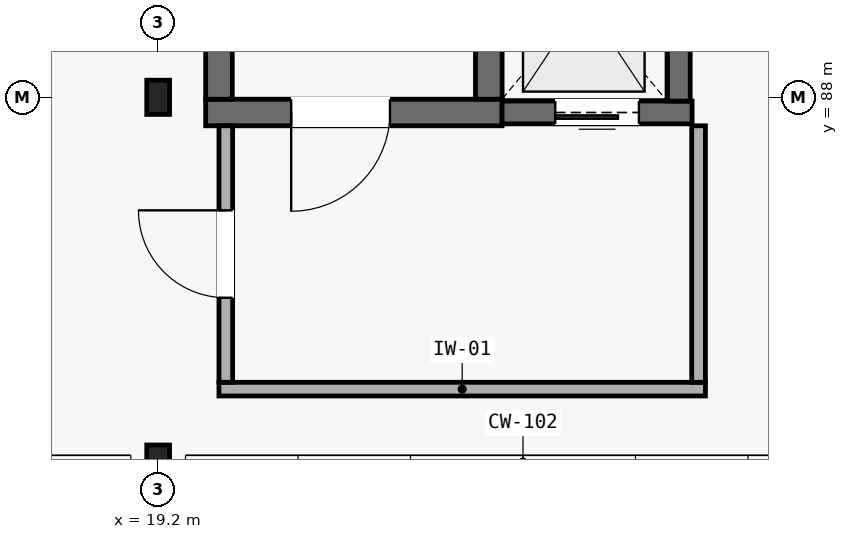
"""IFC4 building model, lengths in metres.
Left out: names, types, materials, properties, quantities, classifications, styles, units other than length and angle.
Written with IfcOpenShell. Run it as: python <this file> out.ifc"""

import sys

from ifc_helpers import new_model, si_unit, direction, frame, frame_2d, origin, origin_2d, place, context, subcontext, project, spatial, rectangle, i_section, extrude, element, fill, save


model = new_model("IFC4")
c1 = context("Model", 3, precision=1e-05, world=origin(), true_north=direction((0.0, 1.0)))
c2 = subcontext(c1, "Body", "Model", "MODEL_VIEW")
j1 = project(units=[si_unit("LENGTHUNIT", "METRE"), si_unit("PLANEANGLEUNIT", "RADIAN")], contexts=[c1])
p1 = place(None, origin())
s1 = spatial("IfcSite", under=j1, at=p1, CompositionType="ELEMENT")
p2 = place(p1, origin())
s2 = spatial("IfcBuilding", under=s1, at=p2, CompositionType="ELEMENT")
p3 = place(p2, frame((0.0, 0.0, 31.15)))
s3 = spatial("IfcBuildingStorey", under=s2, at=p3, CompositionType="ELEMENT", Elevation=31.15)
for number, where, z_axis, x_axis in (
    (1, (19.2, 83.2, 0.0), (0.0, 0.0, 1.0), (1.0, 0.0, 0.0)),
    (2, (19.2, 88.0, 0.0), (0.0, 0.0, 1.0), (1.0, 0.0, 0.0)),
):
    element("IfcColumn", number, at=place(p3, frame(where, z_axis=z_axis, x_axis=x_axis)), inside=s3, PredefinedType="COLUMN", context=c2, shape_type="SweptSolid", body=[
        extrude(i_section(OverallWidth=0.3, OverallDepth=0.45, WebThickness=0.014, FlangeThickness=0.026, FilletRadius=0.027, at=origin_2d()), origin(), (0.0, 0.0, 1.0), 4.9),
    ])
p4 = place(p3, frame((19.825, 87.8, 0.0), z_axis=(0.0, 0.0, 1.0), x_axis=(1.0, 0.0, 0.0)))
e3 = element("IfcWall", 3, at=p4, inside=s3, PredefinedType="SHEAR", context=c2, shape_type="SweptSolid", body=[
    extrude(rectangle(XDim=3.9, YDim=0.35, at=frame_2d((1.95, 0.0))), origin(), (0.0, 0.0, 1.0), 4.71),
])
p5 = place(p4, frame((1.125, 0.0, 0.0)))
e4 = element("IfcOpeningElement", 4, at=p5, cuts=e3, PredefinedType="OPENING", context=c2, shape_type="SweptSolid", body=[
    extrude(rectangle(XDim=1.3, YDim=2.15, at=frame_2d((0.65, 1.075))), frame((0.0, 0.185, 0.0), z_axis=(0.0, -1.0, 0.0), x_axis=(1.0, 0.0, 0.0)), (0.0, 0.0, 1.0), 0.37),
])
for number, where, z_axis, x_axis in (
    (5, (20.0, 87.975, 0.0), (0.0, 0.0, 1.0), (0.0, 1.0, 0.0)),
    (6, (23.55, 87.975, 0.0), (0.0, 0.0, 1.0), (0.0, 1.0, 0.0)),
):
    element("IfcWall", number, at=place(p3, frame(where, z_axis=z_axis, x_axis=x_axis)), inside=s3, PredefinedType="SHEAR", context=c2, shape_type="SweptSolid", body=[
        extrude(rectangle(XDim=7.6, YDim=0.35, at=frame_2d((3.8, 0.0))), origin(), (0.0, 0.0, 1.0), 4.71),
    ])
p6 = place(p3, frame((23.725, 87.8, 0.0), z_axis=(0.0, 0.0, 1.0), x_axis=(1.0, 0.0, 0.0)))
e7 = element("IfcWall", 7, at=p6, inside=s3, PredefinedType="SHEAR", context=c2, shape_type="SweptSolid", body=[
    extrude(rectangle(XDim=2.5, YDim=0.3, at=frame_2d((1.25, 0.0))), origin(), (0.0, 0.0, 1.0), 4.71),
])
p7 = place(p6, frame((0.7, 0.0, 0.0)))
e8 = element("IfcOpeningElement", 8, at=p7, cuts=e7, PredefinedType="OPENING", context=c2, shape_type="SweptSolid", body=[
    extrude(rectangle(XDim=1.1, YDim=2.1, at=frame_2d((0.55, 1.05))), frame((0.0, 0.16, 0.0), z_axis=(0.0, -1.0, 0.0), x_axis=(1.0, 0.0, 0.0)), (0.0, 0.0, 1.0), 0.32),
])
p8 = place(p3, frame((26.05, 87.95, 0.0), z_axis=(0.0, 0.0, 1.0), x_axis=(0.0, 1.0, 0.0)))
e9 = element("IfcWall", 9, at=p8, inside=s3, PredefinedType="SHEAR", context=c2, shape_type="SweptSolid", body=[
    extrude(rectangle(XDim=2.65, YDim=0.3, at=frame_2d((1.325, 0.0))), origin(), (0.0, 0.0, 1.0), 4.71),
])
p9 = place(p3, frame((20.0, 84.16, 0.0), z_axis=(0.0, 0.0, 1.0), x_axis=(1.0, 0.0, 0.0)))
e10 = element("IfcWall", 10, at=p9, inside=s3, PredefinedType="PARTITIONING", context=c2, shape_type="SweptSolid", body=[
    extrude(rectangle(XDim=6.4, YDim=0.18, at=frame_2d((3.2, 0.0))), origin(), (0.0, 0.0, 1.0), 4.71),
])
p10 = place(p3, frame((20.09, 84.25, 0.0), z_axis=(0.0, 0.0, 1.0), x_axis=(0.0, 1.0, 0.0)))
e11 = element("IfcWall", 11, at=p10, inside=s3, PredefinedType="PARTITIONING", context=c2, shape_type="SweptSolid", body=[
    extrude(rectangle(XDim=3.375, YDim=0.18, at=frame_2d((1.688, 0.0))), origin(), (0.0, 0.0, 1.0), 4.71),
])
p11 = place(p10, frame((1.113, 0.0, 0.0)))
e12 = element("IfcOpeningElement", 12, at=p11, cuts=e11, PredefinedType="OPENING", context=c2, shape_type="SweptSolid", body=[
    extrude(rectangle(XDim=1.15, YDim=2.15, at=frame_2d((0.575, 1.075))), frame((0.0, 0.1, 0.0), z_axis=(0.0, -1.0, 0.0), x_axis=(1.0, 0.0, 0.0)), (0.0, 0.0, 1.0), 0.2),
])
p12 = place(p3, frame((26.31, 84.25, 0.0), z_axis=(0.0, 0.0, 1.0), x_axis=(0.0, 1.0, 0.0)))
e13 = element("IfcWall", 13, at=p12, inside=s3, PredefinedType="PARTITIONING", context=c2, shape_type="SweptSolid", body=[
    extrude(rectangle(XDim=3.375, YDim=0.18, at=frame_2d((1.688, 0.0))), origin(), (0.0, 0.0, 1.0), 4.71),
])
p13 = place(p5, frame((1.3, 0.0, 0.0), z_axis=(0.0, 0.0, 1.0), x_axis=(-1.0, 0.0, 0.0)))
e14 = element("IfcDoor", 14, at=p13, inside=s3, OperationType="SINGLE_SWING_LEFT", PredefinedType="DOOR", context=c2, shape_type="SweptSolid", body=[
    extrude(rectangle(XDim=1.3, YDim=2.15, at=frame_2d((0.65, 1.075))), frame((0.0, 0.025, 0.0), z_axis=(0.0, -1.0, 0.0), x_axis=(1.0, 0.0, 0.0)), (0.0, 0.0, 1.0), 0.05),
])
fill(e4, e14)
p14 = place(p7, frame((1.1, 0.0, 0.0), z_axis=(0.0, 0.0, 1.0), x_axis=(-1.0, 0.0, 0.0)))
e15 = element("IfcDoor", 15, at=p14, inside=s3, OperationType="SLIDING_TO_LEFT", PredefinedType="DOOR", context=c2, shape_type="SweptSolid", body=[
    extrude(rectangle(XDim=1.1, YDim=2.1, at=frame_2d((0.55, 1.05))), frame((0.0, 0.025, 0.0), z_axis=(0.0, -1.0, 0.0), x_axis=(1.0, 0.0, 0.0)), (0.0, 0.0, 1.0), 0.05),
])
fill(e8, e15)
p15 = place(p11, origin())
e16 = element("IfcDoor", 16, at=p15, inside=s3, OperationType="SINGLE_SWING_RIGHT", PredefinedType="DOOR", context=c2, shape_type="SweptSolid", body=[
    extrude(rectangle(XDim=1.15, YDim=2.15, at=frame_2d((0.575, 1.075))), frame((0.0, 0.025, 0.0), z_axis=(0.0, -1.0, 0.0), x_axis=(1.0, 0.0, 0.0)), (0.0, 0.0, 1.0), 0.05),
])
fill(e12, e16)
save(model, sys.argv[1])
